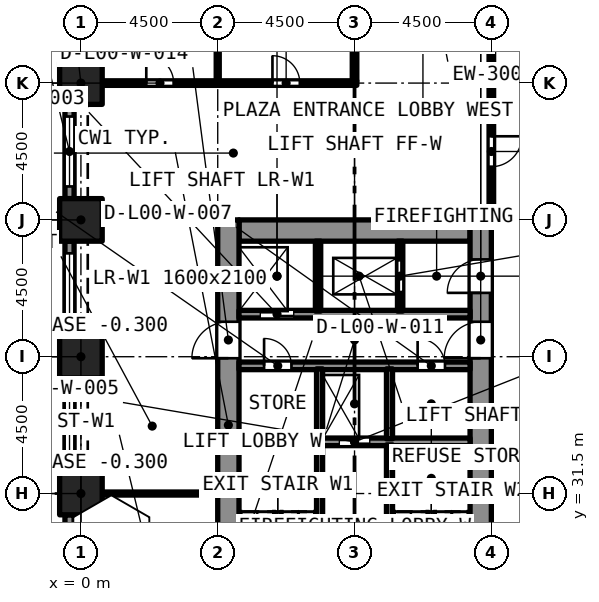
"""IFC4 building model, lengths in metres.
Left out: names, types, materials, properties, quantities, classifications, styles, units other than length and angle.
Written with IfcOpenShell. Run it as: python <this file> out.ifc"""

import sys

from ifc_helpers import new_model, si_unit, direction, frame, frame_2d, origin, origin_2d, place, context, subcontext, project, spatial, rectangle, extrude, element, fill, save


model = new_model("IFC4")
c1 = context("Model", 3, precision=1e-05, world=origin(), true_north=direction((0.0, 1.0)))
c2 = subcontext(c1, "Body", "Model", "MODEL_VIEW")
j1 = project(units=[si_unit("LENGTHUNIT", "METRE"), si_unit("PLANEANGLEUNIT", "RADIAN")], contexts=[c1])
p1 = place(None, origin())
s1 = spatial("IfcSite", under=j1, at=p1, CompositionType="ELEMENT")
p2 = place(p1, origin())
s2 = spatial("IfcBuilding", under=s1, at=p2, CompositionType="ELEMENT")
p3 = place(p2, origin())
s3 = spatial("IfcBuildingStorey", under=s2, at=p3, CompositionType="ELEMENT", Elevation=0.0)
for number, where, z_axis, x_axis in (
    (1, (0.0, 31.5, -0.3), (0.0, 0.0, 1.0), (1.0, 0.0, 0.0)),
    (2, (0.0, 36.0, -0.3), (0.0, 0.0, 1.0), (1.0, 0.0, 0.0)),
    (3, (0.0, 40.5, -0.3), (0.0, 0.0, 1.0), (1.0, 0.0, 0.0)),
    (4, (0.0, 45.0, -0.3), (0.0, 0.0, 1.0), (1.0, 0.0, 0.0)),
):
    element("IfcColumn", number, at=place(p3, frame(where, z_axis=z_axis, x_axis=x_axis)), inside=s3, PredefinedType="COLUMN", context=c2, shape_type="SweptSolid", body=[
        extrude(rectangle(XDim=1.4, YDim=1.4, at=origin_2d()), origin(), (0.0, 0.0, 1.0), 6.3),
    ])
p4 = place(p3, frame((5.2, 40.15, -0.3), z_axis=(0.0, 0.0, 1.0), x_axis=(1.0, 0.0, 0.0)))
e5 = element("IfcWall", 5, at=p4, inside=s3, PredefinedType="SOLIDWALL", context=c2, shape_type="SweptSolid", body=[
    extrude(rectangle(XDim=7.6, YDim=0.7, at=frame_2d((3.8, 0.0))), origin(), (0.0, 0.0, 1.0), 6.3),
])
p5 = place(p3, frame((4.85, 27.0, -0.3), z_axis=(0.0, 0.0, 1.0), x_axis=(0.0, 1.0, 0.0)))
e6 = element("IfcWall", 6, at=p5, inside=s3, PredefinedType="SOLIDWALL", context=c2, shape_type="SweptSolid", body=[
    extrude(rectangle(XDim=13.5, YDim=0.7, at=frame_2d((6.75, 0.0))), origin(), (0.0, 0.0, 1.0), 6.3),
])
p6 = place(p5, frame((0.75, 0.0, 0.3)))
e7 = element("IfcOpeningElement", 7, at=p6, cuts=e6, PredefinedType="OPENING", context=c2, shape_type="SweptSolid", body=[
    extrude(rectangle(XDim=1.1, YDim=2.1, at=frame_2d((0.55, 1.05))), frame((0.0, 0.36, 0.0), z_axis=(0.0, -1.0, 0.0), x_axis=(1.0, 0.0, 0.0)), (0.0, 0.0, 1.0), 0.72),
])
p7 = place(p5, frame((8.95, 0.0, 0.3)))
e8 = element("IfcOpeningElement", 8, at=p7, cuts=e6, PredefinedType="OPENING", context=c2, shape_type="SweptSolid", body=[
    extrude(rectangle(XDim=1.2, YDim=2.1, at=frame_2d((0.6, 1.05))), frame((0.0, 0.36, 0.0), z_axis=(0.0, -1.0, 0.0), x_axis=(1.0, 0.0, 0.0)), (0.0, 0.0, 1.0), 0.72),
])
p8 = place(p3, frame((13.15, 27.0, -0.3), z_axis=(0.0, 0.0, 1.0), x_axis=(0.0, 1.0, 0.0)))
e9 = element("IfcWall", 9, at=p8, inside=s3, PredefinedType="SOLIDWALL", context=c2, shape_type="SweptSolid", body=[
    extrude(rectangle(XDim=13.5, YDim=0.7, at=frame_2d((6.75, 0.0))), origin(), (0.0, 0.0, 1.0), 6.3),
])
p9 = place(p8, frame((0.75, 0.0, 0.3)))
e10 = element("IfcOpeningElement", 10, at=p9, cuts=e9, PredefinedType="OPENING", context=c2, shape_type="SweptSolid", body=[
    extrude(rectangle(XDim=1.1, YDim=2.1, at=frame_2d((0.55, 1.05))), frame((0.0, 0.36, 0.0), z_axis=(0.0, -1.0, 0.0), x_axis=(1.0, 0.0, 0.0)), (0.0, 0.0, 1.0), 0.72),
])
p10 = place(p8, frame((11.1, 0.0, 0.3)))
e11 = element("IfcOpeningElement", 11, at=p10, cuts=e9, PredefinedType="OPENING", context=c2, shape_type="SweptSolid", body=[
    extrude(rectangle(XDim=1.1, YDim=2.1, at=frame_2d((0.55, 1.05))), frame((0.0, 0.36, 0.0), z_axis=(0.0, -1.0, 0.0), x_axis=(1.0, 0.0, 0.0)), (0.0, 0.0, 1.0), 0.72),
])
p11 = place(p8, frame((8.95, 0.0, 0.3)))
e12 = element("IfcOpeningElement", 12, at=p11, cuts=e9, PredefinedType="OPENING", context=c2, shape_type="SweptSolid", body=[
    extrude(rectangle(XDim=1.2, YDim=2.1, at=frame_2d((0.6, 1.05))), frame((0.0, 0.36, 0.0), z_axis=(0.0, -1.0, 0.0), x_axis=(1.0, 0.0, 0.0)), (0.0, 0.0, 1.0), 0.72),
])
p12 = place(p3, frame((-0.092, 45.757, 0.0), z_axis=(0.0, 0.0, 1.0), x_axis=(0.382737135771, 0.923857286003, 0.0)))
e13 = element("IfcWall", 13, at=p12, inside=s3, PredefinedType="SOLIDWALL", context=c2, shape_type="SweptSolid", body=[
    extrude(rectangle(XDim=1.865, YDim=0.3, at=frame_2d((0.933, 0.0))), origin(), (0.0, 0.0, 1.0), 6.0),
])
p13 = place(p12, frame((0.508, 0.0, 0.45)))
e14 = element("IfcOpeningElement", 14, at=p13, cuts=e13, PredefinedType="OPENING", context=c2, shape_type="SweptSolid", body=[
    extrude(rectangle(XDim=1.1, YDim=3.3, at=frame_2d((0.55, 1.65))), frame((0.0, 0.16, 0.0), z_axis=(0.0, -1.0, 0.0), x_axis=(1.0, 0.0, 0.0)), (0.0, 0.0, 1.0), 0.32),
])
p14 = place(p3, frame((-0.375, 41.2, 0.0), z_axis=(0.0, 0.0, 1.0), x_axis=(0.0, 1.0, 0.0)))
e15 = element("IfcWall", 15, at=p14, inside=s3, PredefinedType="SOLIDWALL", context=c2, shape_type="SweptSolid", body=[
    extrude(rectangle(XDim=3.1, YDim=0.3, at=frame_2d((1.55, 0.0))), origin(), (0.0, 0.0, 1.0), 6.0),
])
p15 = place(p14, frame((0.4, 0.0, 0.45)))
e16 = element("IfcOpeningElement", 16, at=p15, cuts=e15, PredefinedType="OPENING", context=c2, shape_type="SweptSolid", body=[
    extrude(rectangle(XDim=2.3, YDim=3.3, at=frame_2d((1.15, 1.65))), frame((0.0, 0.16, 0.0), z_axis=(0.0, -1.0, 0.0), x_axis=(1.0, 0.0, 0.0)), (0.0, 0.0, 1.0), 0.32),
])
p16 = place(p3, frame((-0.375, 36.7, 0.0), z_axis=(0.0, 0.0, 1.0), x_axis=(0.0, 1.0, 0.0)))
e17 = element("IfcWall", 17, at=p16, inside=s3, PredefinedType="SOLIDWALL", context=c2, shape_type="SweptSolid", body=[
    extrude(rectangle(XDim=3.1, YDim=0.3, at=frame_2d((1.55, 0.0))), origin(), (0.0, 0.0, 1.0), 6.0),
])
p17 = place(p16, frame((0.4, 0.0, 0.45)))
e18 = element("IfcOpeningElement", 18, at=p17, cuts=e17, PredefinedType="OPENING", context=c2, shape_type="SweptSolid", body=[
    extrude(rectangle(XDim=2.3, YDim=3.3, at=frame_2d((1.15, 1.65))), frame((0.0, 0.16, 0.0), z_axis=(0.0, -1.0, 0.0), x_axis=(1.0, 0.0, 0.0)), (0.0, 0.0, 1.0), 0.32),
])
p18 = place(p3, frame((-0.375, 32.2, 0.0), z_axis=(0.0, 0.0, 1.0), x_axis=(0.0, 1.0, 0.0)))
e19 = element("IfcWall", 19, at=p18, inside=s3, PredefinedType="SOLIDWALL", context=c2, shape_type="SweptSolid", body=[
    extrude(rectangle(XDim=3.1, YDim=0.3, at=frame_2d((1.55, 0.0))), origin(), (0.0, 0.0, 1.0), 6.0),
])
p19 = place(p18, frame((0.4, 0.0, 0.45)))
e20 = element("IfcOpeningElement", 20, at=p19, cuts=e19, PredefinedType="OPENING", context=c2, shape_type="SweptSolid", body=[
    extrude(rectangle(XDim=2.3, YDim=3.3, at=frame_2d((1.15, 1.65))), frame((0.0, 0.16, 0.0), z_axis=(0.0, -1.0, 0.0), x_axis=(1.0, 0.0, 0.0)), (0.0, 0.0, 1.0), 0.32),
])
p20 = place(p3, frame((-0.375, 27.7, 0.0), z_axis=(0.0, 0.0, 1.0), x_axis=(0.0, 1.0, 0.0)))
e21 = element("IfcWall", 21, at=p20, inside=s3, PredefinedType="SOLIDWALL", context=c2, shape_type="SweptSolid", body=[
    extrude(rectangle(XDim=3.1, YDim=0.3, at=frame_2d((1.55, 0.0))), origin(), (0.0, 0.0, 1.0), 6.0),
])
p21 = place(p20, frame((0.95, 0.0, 0.0)))
e22 = element("IfcOpeningElement", 22, at=p21, cuts=e21, PredefinedType="OPENING", context=c2, shape_type="SweptSolid", body=[
    extrude(rectangle(XDim=1.2, YDim=2.4, at=frame_2d((0.6, 1.2))), frame((0.0, 0.16, 0.0), z_axis=(0.0, -1.0, 0.0), x_axis=(1.0, 0.0, 0.0)), (0.0, 0.0, 1.0), 0.32),
])
p22 = place(p3, frame((5.2, 33.2, 0.0), z_axis=(0.0, 0.0, 1.0), x_axis=(1.0, 0.0, 0.0)))
e23 = element("IfcWall", 23, at=p22, inside=s3, PredefinedType="SOLIDWALL", context=c2, shape_type="SweptSolid", body=[
    extrude(rectangle(XDim=7.6, YDim=0.25, at=frame_2d((3.8, 0.0))), origin(), (0.0, 0.0, 1.0), 5.65),
])
p23 = place(p22, frame((3.3, 0.0, 0.0)))
e24 = element("IfcOpeningElement", 24, at=p23, cuts=e23, PredefinedType="OPENING", context=c2, shape_type="SweptSolid", body=[
    extrude(rectangle(XDim=1.0, YDim=2.1, at=frame_2d((0.5, 1.05))), frame((0.0, 0.135, 0.0), z_axis=(0.0, -1.0, 0.0), x_axis=(1.0, 0.0, 0.0)), (0.0, 0.0, 1.0), 0.27),
])
p24 = place(p3, frame((5.2, 35.7, 0.0), z_axis=(0.0, 0.0, 1.0), x_axis=(1.0, 0.0, 0.0)))
e25 = element("IfcWall", 25, at=p24, inside=s3, PredefinedType="SOLIDWALL", context=c2, shape_type="SweptSolid", body=[
    extrude(rectangle(XDim=7.6, YDim=0.25, at=frame_2d((3.8, 0.0))), origin(), (0.0, 0.0, 1.0), 5.65),
])
p25 = place(p24, frame((0.825, 0.0, 0.0)))
e26 = element("IfcOpeningElement", 26, at=p25, cuts=e25, PredefinedType="OPENING", context=c2, shape_type="SweptSolid", body=[
    extrude(rectangle(XDim=0.9, YDim=2.1, at=frame_2d((0.45, 1.05))), frame((0.0, 0.135, 0.0), z_axis=(0.0, -1.0, 0.0), x_axis=(1.0, 0.0, 0.0)), (0.0, 0.0, 1.0), 0.27),
])
p26 = place(p24, frame((5.875, 0.0, 0.0)))
e27 = element("IfcOpeningElement", 27, at=p26, cuts=e25, PredefinedType="OPENING", context=c2, shape_type="SweptSolid", body=[
    extrude(rectangle(XDim=0.9, YDim=2.1, at=frame_2d((0.45, 1.05))), frame((0.0, 0.135, 0.0), z_axis=(0.0, -1.0, 0.0), x_axis=(1.0, 0.0, 0.0)), (0.0, 0.0, 1.0), 0.27),
])
p27 = place(p3, frame((5.2, 37.4, 0.0), z_axis=(0.0, 0.0, 1.0), x_axis=(1.0, 0.0, 0.0)))
e28 = element("IfcWall", 28, at=p27, inside=s3, PredefinedType="SOLIDWALL", context=c2, shape_type="SweptSolid", body=[
    extrude(rectangle(XDim=7.6, YDim=0.25, at=frame_2d((3.8, 0.0))), origin(), (0.0, 0.0, 1.0), 5.65),
])
p28 = place(p27, frame((0.7, 0.0, 0.0)))
e29 = element("IfcOpeningElement", 29, at=p28, cuts=e28, PredefinedType="OPENING", context=c2, shape_type="SweptSolid", body=[
    extrude(rectangle(XDim=1.1, YDim=2.4, at=frame_2d((0.55, 1.2))), frame((0.0, 0.135, 0.0), z_axis=(0.0, -1.0, 0.0), x_axis=(1.0, 0.0, 0.0)), (0.0, 0.0, 1.0), 0.27),
])
p29 = place(p3, frame((7.85, 27.7, 0.0), z_axis=(0.0, 0.0, 1.0), x_axis=(0.0, 1.0, 0.0)))
e30 = element("IfcWall", 30, at=p29, inside=s3, PredefinedType="SOLIDWALL", context=c2, shape_type="SweptSolid", body=[
    extrude(rectangle(XDim=5.4, YDim=0.2, at=frame_2d((2.7, 0.0))), origin(), (0.0, 0.0, 1.0), 5.65),
])
p30 = place(p29, frame((0.2, 0.0, 0.0)))
e31 = element("IfcOpeningElement", 31, at=p30, cuts=e30, PredefinedType="OPENING", context=c2, shape_type="SweptSolid", body=[
    extrude(rectangle(XDim=0.9, YDim=2.1, at=frame_2d((0.45, 1.05))), frame((0.0, 0.11, 0.0), z_axis=(0.0, -1.0, 0.0), x_axis=(1.0, 0.0, 0.0)), (0.0, 0.0, 1.0), 0.22),
])
p31 = place(p3, frame((10.15, 27.7, 0.0), z_axis=(0.0, 0.0, 1.0), x_axis=(0.0, 1.0, 0.0)))
e32 = element("IfcWall", 32, at=p31, inside=s3, PredefinedType="SOLIDWALL", context=c2, shape_type="SweptSolid", body=[
    extrude(rectangle(XDim=5.4, YDim=0.2, at=frame_2d((2.7, 0.0))), origin(), (0.0, 0.0, 1.0), 5.65),
])
p32 = place(p31, frame((0.2, 0.0, 0.0)))
e33 = element("IfcOpeningElement", 33, at=p32, cuts=e32, PredefinedType="OPENING", context=c2, shape_type="SweptSolid", body=[
    extrude(rectangle(XDim=0.9, YDim=2.1, at=frame_2d((0.45, 1.05))), frame((0.0, 0.11, 0.0), z_axis=(0.0, -1.0, 0.0), x_axis=(1.0, 0.0, 0.0)), (0.0, 0.0, 1.0), 0.22),
])
for number, where, z_axis, x_axis in (
    (34, (7.85, 33.3, 0.0), (0.0, 0.0, 1.0), (0.0, 1.0, 0.0)),
    (35, (10.15, 33.3, 0.0), (0.0, 0.0, 1.0), (0.0, 1.0, 0.0)),
):
    element("IfcWall", number, at=place(p3, frame(where, z_axis=z_axis, x_axis=x_axis)), inside=s3, PredefinedType="SOLIDWALL", context=c2, shape_type="SweptSolid", body=[
        extrude(rectangle(XDim=2.3, YDim=0.2, at=frame_2d((1.15, 0.0))), origin(), (0.0, 0.0, 1.0), 5.65),
    ])
p33 = place(p3, frame((7.8, 37.5, 0.0), z_axis=(0.0, 0.0, 1.0), x_axis=(0.0, 1.0, 0.0)))
e36 = element("IfcWall", 36, at=p33, inside=s3, PredefinedType="SOLIDWALL", context=c2, shape_type="SweptSolid", body=[
    extrude(rectangle(XDim=2.3, YDim=0.175, at=frame_2d((1.15, 0.0))), origin(), (0.0, 0.0, 1.0), 5.65),
])
p34 = place(p3, frame((10.5, 37.5, 0.0), z_axis=(0.0, 0.0, 1.0), x_axis=(0.0, 1.0, 0.0)))
e37 = element("IfcWall", 37, at=p34, inside=s3, PredefinedType="SOLIDWALL", context=c2, shape_type="SweptSolid", body=[
    extrude(rectangle(XDim=2.3, YDim=0.175, at=frame_2d((1.15, 0.0))), origin(), (0.0, 0.0, 1.0), 5.65),
])
p35 = place(p34, frame((0.65, 0.0, 0.0)))
e38 = element("IfcOpeningElement", 38, at=p35, cuts=e37, PredefinedType="OPENING", context=c2, shape_type="SweptSolid", body=[
    extrude(rectangle(XDim=1.0, YDim=2.1, at=frame_2d((0.5, 1.05))), frame((0.0, 0.097, 0.0), z_axis=(0.0, -1.0, 0.0), x_axis=(1.0, 0.0, 0.0)), (0.0, 0.0, 1.0), 0.195),
])
p36 = place(p3, frame((13.575, 40.5, 0.0), z_axis=(0.0, 0.0, 1.0), x_axis=(1.0, 0.0, 0.0)))
e39 = element("IfcWall", 39, at=p36, inside=s3, PredefinedType="PARTITIONING", context=c2, shape_type="SweptSolid", body=[
    extrude(rectangle(XDim=3.725, YDim=0.15, at=frame_2d((1.863, 0.0))), origin(), (0.0, 0.0, 1.0), 5.65),
])
p37 = place(p3, frame((13.5, 45.0, 0.0), z_axis=(0.0, 0.0, 1.0), x_axis=(0.0, 1.0, 0.0)))
e40 = element("IfcWall", 40, at=p37, inside=s3, PredefinedType="PARTITIONING", context=c2, shape_type="SweptSolid", body=[
    extrude(rectangle(XDim=3.8, YDim=0.15, at=frame_2d((1.9, 0.0))), origin(), (0.0, 0.0, 1.0), 5.65),
])
p38 = place(p3, frame((13.5, 45.0, 0.0), z_axis=(0.0, 0.0, 1.0), x_axis=(0.0, -1.0, 0.0)))
e41 = element("IfcWall", 41, at=p38, inside=s3, PredefinedType="PARTITIONING", context=c2, shape_type="SweptSolid", body=[
    extrude(rectangle(XDim=4.575, YDim=0.15, at=frame_2d((2.288, 0.0))), origin(), (0.0, 0.0, 1.0), 5.65),
])
p39 = place(p38, frame((1.75, 0.0, 0.0)))
e42 = element("IfcOpeningElement", 42, at=p39, cuts=e41, PredefinedType="OPENING", context=c2, shape_type="SweptSolid", body=[
    extrude(rectangle(XDim=1.0, YDim=2.1, at=frame_2d((0.5, 1.05))), frame((0.0, 0.085, 0.0), z_axis=(0.0, -1.0, 0.0), x_axis=(1.0, 0.0, 0.0)), (0.0, 0.0, 1.0), 0.17),
])
for number, where, z_axis, x_axis in (
    (43, (13.5, 31.5, 0.0), (0.0, 0.0, 1.0), (1.0, 0.0, 0.0)),
    (44, (0.7, 31.5, 0.0), (0.0, 0.0, 1.0), (1.0, 0.0, 0.0)),
):
    element("IfcWall", number, at=place(p3, frame(where, z_axis=z_axis, x_axis=x_axis)), inside=s3, PredefinedType="PARTITIONING", context=c2, shape_type="SweptSolid", body=[
        extrude(rectangle(XDim=3.8, YDim=0.1, at=frame_2d((1.9, 0.0))), origin(), (0.0, 0.0, 1.0), 5.65),
    ])
p40 = place(p3, frame((4.5, 45.075, 0.0), z_axis=(0.0, 0.0, 1.0), x_axis=(0.0, 1.0, 0.0)))
e45 = element("IfcWall", 45, at=p40, inside=s3, PredefinedType="PARTITIONING", context=c2, shape_type="SweptSolid", body=[
    extrude(rectangle(XDim=3.725, YDim=0.1, at=frame_2d((1.863, 0.0))), origin(), (0.0, 0.0, 1.0), 5.65),
])
p41 = place(p3, frame((0.7, 45.0, 0.0), z_axis=(0.0, 0.0, 1.0), x_axis=(1.0, 0.0, 0.0)))
e46 = element("IfcWall", 46, at=p41, inside=s3, PredefinedType="PARTITIONING", context=c2, shape_type="SweptSolid", body=[
    extrude(rectangle(XDim=3.8, YDim=0.15, at=frame_2d((1.9, 0.0))), origin(), (0.0, 0.0, 1.0), 5.65),
])
p42 = place(p41, frame((1.45, 0.0, 0.0)))
e47 = element("IfcOpeningElement", 47, at=p42, cuts=e46, PredefinedType="OPENING", context=c2, shape_type="SweptSolid", body=[
    extrude(rectangle(XDim=0.9, YDim=2.1, at=frame_2d((0.45, 1.05))), frame((0.0, 0.085, 0.0), z_axis=(0.0, -1.0, 0.0), x_axis=(1.0, 0.0, 0.0)), (0.0, 0.0, 1.0), 0.17),
])
p43 = place(p3, frame((9.0, 45.075, 0.0), z_axis=(0.0, 0.0, 1.0), x_axis=(0.0, 1.0, 0.0)))
e48 = element("IfcWall", 48, at=p43, inside=s3, PredefinedType="PARTITIONING", context=c2, shape_type="SweptSolid", body=[
    extrude(rectangle(XDim=3.725, YDim=0.15, at=frame_2d((1.863, 0.0))), origin(), (0.0, 0.0, 1.0), 5.65),
])
p44 = place(p3, frame((4.5, 45.0, 0.0), z_axis=(0.0, 0.0, 1.0), x_axis=(1.0, 0.0, 0.0)))
e49 = element("IfcWall", 49, at=p44, inside=s3, PredefinedType="PARTITIONING", context=c2, shape_type="SweptSolid", body=[
    extrude(rectangle(XDim=4.575, YDim=0.15, at=frame_2d((2.288, 0.0))), origin(), (0.0, 0.0, 1.0), 5.65),
])
p45 = place(p44, frame((1.8, 0.0, 0.0)))
e50 = element("IfcOpeningElement", 50, at=p45, cuts=e49, PredefinedType="OPENING", context=c2, shape_type="SweptSolid", body=[
    extrude(rectangle(XDim=0.9, YDim=2.1, at=frame_2d((0.45, 1.05))), frame((0.0, 0.085, 0.0), z_axis=(0.0, -1.0, 0.0), x_axis=(1.0, 0.0, 0.0)), (0.0, 0.0, 1.0), 0.17),
])
p46 = place(p15, origin())
e51 = element("IfcWindow", 51, at=p46, inside=s3, PartitioningType="SINGLE_PANEL", PredefinedType="WINDOW", context=c2, shape_type="SweptSolid", body=[
    extrude(rectangle(XDim=2.3, YDim=3.3, at=frame_2d((1.15, 1.65))), frame((0.0, 0.03, 0.0), z_axis=(0.0, -1.0, 0.0), x_axis=(1.0, 0.0, 0.0)), (0.0, 0.0, 1.0), 0.06),
])
fill(e16, e51)
p47 = place(p17, origin())
e52 = element("IfcWindow", 52, at=p47, inside=s3, PartitioningType="SINGLE_PANEL", PredefinedType="WINDOW", context=c2, shape_type="SweptSolid", body=[
    extrude(rectangle(XDim=2.3, YDim=3.3, at=frame_2d((1.15, 1.65))), frame((0.0, 0.03, 0.0), z_axis=(0.0, -1.0, 0.0), x_axis=(1.0, 0.0, 0.0)), (0.0, 0.0, 1.0), 0.06),
])
fill(e18, e52)
p48 = place(p19, origin())
e53 = element("IfcWindow", 53, at=p48, inside=s3, PartitioningType="SINGLE_PANEL", PredefinedType="WINDOW", context=c2, shape_type="SweptSolid", body=[
    extrude(rectangle(XDim=2.3, YDim=3.3, at=frame_2d((1.15, 1.65))), frame((0.0, 0.03, 0.0), z_axis=(0.0, -1.0, 0.0), x_axis=(1.0, 0.0, 0.0)), (0.0, 0.0, 1.0), 0.06),
])
fill(e20, e53)
p49 = place(p28, origin())
e54 = element("IfcDoor", 54, at=p49, inside=s3, OperationType="SLIDING_TO_LEFT", PredefinedType="DOOR", context=c2, shape_type="SweptSolid", body=[
    extrude(rectangle(XDim=1.1, YDim=2.4, at=frame_2d((0.55, 1.2))), frame((0.0, 0.025, 0.0), z_axis=(0.0, -1.0, 0.0), x_axis=(1.0, 0.0, 0.0)), (0.0, 0.0, 1.0), 0.05),
])
fill(e29, e54)
p50 = place(p35, origin())
e55 = element("IfcDoor", 55, at=p50, inside=s3, OperationType="SLIDING_TO_LEFT", PredefinedType="DOOR", context=c2, shape_type="SweptSolid", body=[
    extrude(rectangle(XDim=1.0, YDim=2.1, at=frame_2d((0.5, 1.05))), frame((0.0, 0.025, 0.0), z_axis=(0.0, -1.0, 0.0), x_axis=(1.0, 0.0, 0.0)), (0.0, 0.0, 1.0), 0.05),
])
fill(e38, e55)
p51 = place(p23, origin())
e56 = element("IfcDoor", 56, at=p51, inside=s3, OperationType="SLIDING_TO_LEFT", PredefinedType="DOOR", context=c2, shape_type="SweptSolid", body=[
    extrude(rectangle(XDim=1.0, YDim=2.1, at=frame_2d((0.5, 1.05))), frame((0.0, 0.025, 0.0), z_axis=(0.0, -1.0, 0.0), x_axis=(1.0, 0.0, 0.0)), (0.0, 0.0, 1.0), 0.05),
])
fill(e24, e56)
p52 = place(p25, origin())
e57 = element("IfcDoor", 57, at=p52, inside=s3, OperationType="SINGLE_SWING_LEFT", PredefinedType="DOOR", context=c2, shape_type="SweptSolid", body=[
    extrude(rectangle(XDim=0.9, YDim=2.1, at=frame_2d((0.45, 1.05))), frame((0.0, 0.025, 0.0), z_axis=(0.0, -1.0, 0.0), x_axis=(1.0, 0.0, 0.0)), (0.0, 0.0, 1.0), 0.05),
])
fill(e26, e57)
p53 = place(p26, origin())
e58 = element("IfcDoor", 58, at=p53, inside=s3, OperationType="SINGLE_SWING_LEFT", PredefinedType="DOOR", context=c2, shape_type="SweptSolid", body=[
    extrude(rectangle(XDim=0.9, YDim=2.1, at=frame_2d((0.45, 1.05))), frame((0.0, 0.025, 0.0), z_axis=(0.0, -1.0, 0.0), x_axis=(1.0, 0.0, 0.0)), (0.0, 0.0, 1.0), 0.05),
])
fill(e27, e58)
p54 = place(p10, origin())
e59 = element("IfcDoor", 59, at=p54, inside=s3, OperationType="SINGLE_SWING_LEFT", PredefinedType="DOOR", context=c2, shape_type="SweptSolid", body=[
    extrude(rectangle(XDim=1.1, YDim=2.1, at=frame_2d((0.55, 1.05))), frame((0.0, 0.025, 0.0), z_axis=(0.0, -1.0, 0.0), x_axis=(1.0, 0.0, 0.0)), (0.0, 0.0, 1.0), 0.05),
])
fill(e11, e59)
p55 = place(p7, origin())
e60 = element("IfcDoor", 60, at=p55, inside=s3, OperationType="SINGLE_SWING_LEFT", PredefinedType="DOOR", context=c2, shape_type="SweptSolid", body=[
    extrude(rectangle(XDim=1.2, YDim=2.1, at=frame_2d((0.6, 1.05))), frame((0.0, 0.025, 0.0), z_axis=(0.0, -1.0, 0.0), x_axis=(1.0, 0.0, 0.0)), (0.0, 0.0, 1.0), 0.05),
])
fill(e8, e60)
p56 = place(p11, origin())
e61 = element("IfcDoor", 61, at=p56, inside=s3, OperationType="SINGLE_SWING_LEFT", PredefinedType="DOOR", context=c2, shape_type="SweptSolid", body=[
    extrude(rectangle(XDim=1.2, YDim=2.1, at=frame_2d((0.6, 1.05))), frame((0.0, 0.025, 0.0), z_axis=(0.0, -1.0, 0.0), x_axis=(1.0, 0.0, 0.0)), (0.0, 0.0, 1.0), 0.05),
])
fill(e12, e61)
p57 = place(p39, origin())
e62 = element("IfcDoor", 62, at=p57, inside=s3, OperationType="SINGLE_SWING_LEFT", PredefinedType="DOOR", context=c2, shape_type="SweptSolid", body=[
    extrude(rectangle(XDim=1.0, YDim=2.1, at=frame_2d((0.5, 1.05))), frame((0.0, 0.025, 0.0), z_axis=(0.0, -1.0, 0.0), x_axis=(1.0, 0.0, 0.0)), (0.0, 0.0, 1.0), 0.05),
])
fill(e42, e62)
p58 = place(p42, origin())
e63 = element("IfcDoor", 63, at=p58, inside=s3, OperationType="SINGLE_SWING_RIGHT", PredefinedType="DOOR", context=c2, shape_type="SweptSolid", body=[
    extrude(rectangle(XDim=0.9, YDim=2.1, at=frame_2d((0.45, 1.05))), frame((0.0, 0.025, 0.0), z_axis=(0.0, -1.0, 0.0), x_axis=(1.0, 0.0, 0.0)), (0.0, 0.0, 1.0), 0.05),
])
fill(e47, e63)
p59 = place(p45, origin())
e64 = element("IfcDoor", 64, at=p59, inside=s3, OperationType="SINGLE_SWING_LEFT", PredefinedType="DOOR", context=c2, shape_type="SweptSolid", body=[
    extrude(rectangle(XDim=0.9, YDim=2.1, at=frame_2d((0.45, 1.05))), frame((0.0, 0.025, 0.0), z_axis=(0.0, -1.0, 0.0), x_axis=(1.0, 0.0, 0.0)), (0.0, 0.0, 1.0), 0.05),
])
fill(e50, e64)
save(model, sys.argv[1])
